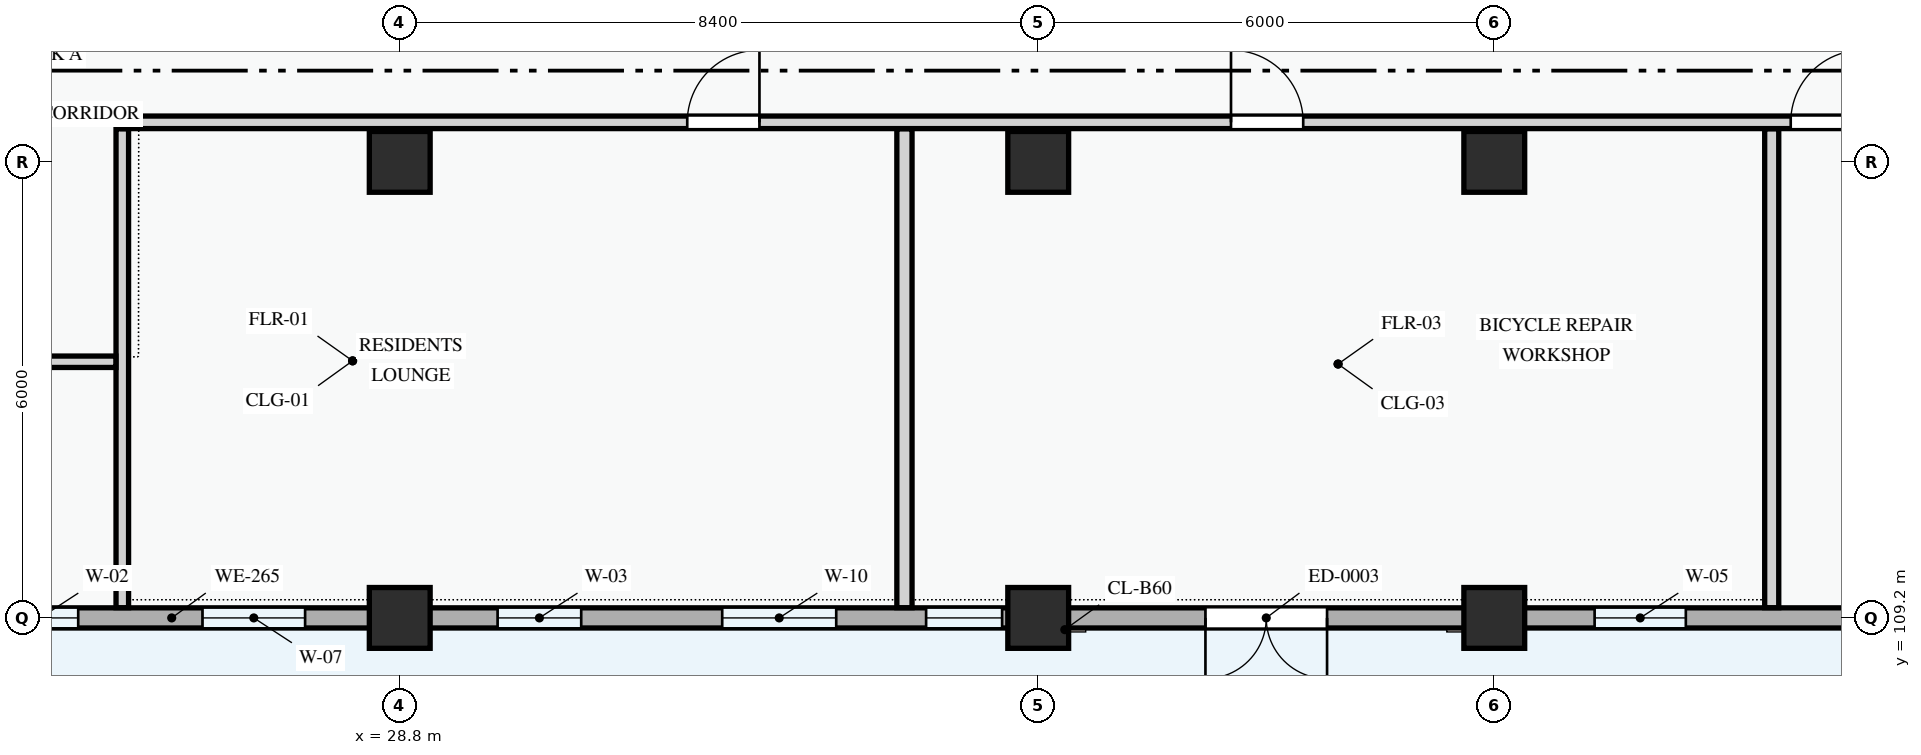
"""IFC4 building model, lengths in metres.
Left out: names, types, materials, properties, quantities, classifications, styles, units other than length and angle.
Written with IfcOpenShell. Run it as: python <this file> out.ifc"""

import sys

from ifc_helpers import new_model, si_unit, direction, frame, frame_2d, origin, origin_2d, place, context, subcontext, project, spatial, rectangle, extrude, element, fill, save


model = new_model("IFC4")
c1 = context("Model", 3, precision=1e-05, world=origin(), true_north=direction((0.0, 1.0)))
c2 = subcontext(c1, "Body", "Model", "MODEL_VIEW")
j1 = project(units=[si_unit("LENGTHUNIT", "METRE"), si_unit("PLANEANGLEUNIT", "RADIAN")], contexts=[c1])
p1 = place(None, origin())
s1 = spatial("IfcSite", under=j1, at=p1, CompositionType="ELEMENT")
p2 = place(p1, origin())
s2 = spatial("IfcBuilding", under=s1, at=p2, CompositionType="ELEMENT")
p3 = place(p2, origin())
s3 = spatial("IfcBuildingStorey", under=s2, at=p3, CompositionType="ELEMENT", Elevation=0.0)
for number, where, z_axis, x_axis in (
    (1, (28.8, 109.2, 0.0), (0.0, 0.0, 1.0), (1.0, 0.0, 0.0)),
    (2, (28.8, 115.2, 0.0), (0.0, 0.0, 1.0), (1.0, 0.0, 0.0)),
    (3, (37.2, 109.2, 0.0), (0.0, 0.0, 1.0), (1.0, 0.0, 0.0)),
    (4, (37.2, 115.2, 0.0), (0.0, 0.0, 1.0), (1.0, 0.0, 0.0)),
    (5, (43.2, 109.2, 0.0), (0.0, 0.0, 1.0), (1.0, 0.0, 0.0)),
    (6, (43.2, 115.2, 0.0), (0.0, 0.0, 1.0), (1.0, 0.0, 0.0)),
):
    element("IfcColumn", number, at=place(p3, frame(where, z_axis=z_axis, x_axis=x_axis)), inside=s3, PredefinedType="COLUMN", context=c2, shape_type="SweptSolid", body=[
        extrude(rectangle(XDim=0.8, YDim=0.8, at=origin_2d()), origin(), (0.0, 0.0, 1.0), 4.5),
    ])
p4 = place(p3, frame((22.8, 109.2, 0.0), z_axis=(0.0, 0.0, 1.0), x_axis=(1.0, 0.0, 0.0)))
e7 = element("IfcWall", 7, at=p4, inside=s3, PredefinedType="STANDARD", context=c2, shape_type="SweptSolid", body=[
    extrude(rectangle(XDim=6.0, YDim=0.265, at=frame_2d((3.0, 0.0))), origin(), (0.0, 0.0, 1.0), 3.585),
])
p5 = place(p4, frame((0.77, 0.0, 0.78)))
e8 = element("IfcOpeningElement", 8, at=p5, cuts=e7, PredefinedType="OPENING", context=c2, shape_type="SweptSolid", body=[
    extrude(rectangle(XDim=1.0, YDim=1.25, at=frame_2d((0.5, 0.625))), frame((0.0, 0.143, 0.0), z_axis=(0.0, -1.0, 0.0), x_axis=(1.0, 0.0, 0.0)), (0.0, 0.0, 1.0), 0.285),
])
p6 = place(p4, frame((3.405, 0.0, 0.78)))
e9 = element("IfcOpeningElement", 9, at=p6, cuts=e7, PredefinedType="OPENING", context=c2, shape_type="SweptSolid", body=[
    extrude(rectangle(XDim=1.35, YDim=1.55, at=frame_2d((0.675, 0.775))), frame((0.0, 0.143, 0.0), z_axis=(0.0, -1.0, 0.0), x_axis=(1.0, 0.0, 0.0)), (0.0, 0.0, 1.0), 0.285),
])
p7 = place(p3, frame((28.8, 109.2, 0.0), z_axis=(0.0, 0.0, 1.0), x_axis=(1.0, 0.0, 0.0)))
e10 = element("IfcWall", 10, at=p7, inside=s3, PredefinedType="STANDARD", context=c2, shape_type="SweptSolid", body=[
    extrude(rectangle(XDim=8.4, YDim=0.265, at=frame_2d((4.2, 0.0))), origin(), (0.0, 0.0, 1.0), 3.485),
])
p8 = place(p7, frame((1.288, 0.0, 0.78)))
e11 = element("IfcOpeningElement", 11, at=p8, cuts=e10, PredefinedType="OPENING", context=c2, shape_type="SweptSolid", body=[
    extrude(rectangle(XDim=1.1, YDim=1.3, at=frame_2d((0.55, 0.65))), frame((0.0, 0.143, 0.0), z_axis=(0.0, -1.0, 0.0), x_axis=(1.0, 0.0, 0.0)), (0.0, 0.0, 1.0), 0.285),
])
p9 = place(p7, frame((4.242, 0.0, 0.78)))
e12 = element("IfcOpeningElement", 12, at=p9, cuts=e10, PredefinedType="OPENING", context=c2, shape_type="SweptSolid", body=[
    extrude(rectangle(XDim=1.5, YDim=1.5, at=frame_2d((0.75, 0.75))), frame((0.0, 0.143, 0.0), z_axis=(0.0, -1.0, 0.0), x_axis=(1.0, 0.0, 0.0)), (0.0, 0.0, 1.0), 0.285),
])
p10 = place(p7, frame((6.925, 0.0, 0.78)))
e13 = element("IfcOpeningElement", 13, at=p10, cuts=e10, PredefinedType="OPENING", context=c2, shape_type="SweptSolid", body=[
    extrude(rectangle(XDim=1.0, YDim=1.25, at=frame_2d((0.5, 0.625))), frame((0.0, 0.143, 0.0), z_axis=(0.0, -1.0, 0.0), x_axis=(1.0, 0.0, 0.0)), (0.0, 0.0, 1.0), 0.285),
])
p11 = place(p3, frame((37.2, 109.2, 0.0), z_axis=(0.0, 0.0, 1.0), x_axis=(1.0, 0.0, 0.0)))
e14 = element("IfcWall", 14, at=p11, inside=s3, PredefinedType="STANDARD", context=c2, shape_type="SweptSolid", body=[
    extrude(rectangle(XDim=6.0, YDim=0.265, at=frame_2d((3.0, 0.0))), origin(), (0.0, 0.0, 1.0), 3.585),
])
p12 = place(p11, frame((2.2, 0.0, 0.0)))
e15 = element("IfcOpeningElement", 15, at=p12, cuts=e14, PredefinedType="OPENING", context=c2, shape_type="SweptSolid", body=[
    extrude(rectangle(XDim=1.6, YDim=2.35, at=frame_2d((0.8, 1.175))), frame((0.0, 0.143, 0.0), z_axis=(0.0, -1.0, 0.0), x_axis=(1.0, 0.0, 0.0)), (0.0, 0.0, 1.0), 0.285),
])
p13 = place(p3, frame((43.2, 109.2, 0.0), z_axis=(0.0, 0.0, 1.0), x_axis=(1.0, 0.0, 0.0)))
e16 = element("IfcWall", 16, at=p13, inside=s3, PredefinedType="STANDARD", context=c2, shape_type="SweptSolid", body=[
    extrude(rectangle(XDim=8.4, YDim=0.265, at=frame_2d((4.2, 0.0))), origin(), (0.0, 0.0, 1.0), 3.485),
])
p14 = place(p13, frame((1.32, 0.0, 0.78)))
e17 = element("IfcOpeningElement", 17, at=p14, cuts=e16, PredefinedType="OPENING", context=c2, shape_type="SweptSolid", body=[
    extrude(rectangle(XDim=1.2, YDim=1.5, at=frame_2d((0.6, 0.75))), frame((0.0, 0.143, 0.0), z_axis=(0.0, -1.0, 0.0), x_axis=(1.0, 0.0, 0.0)), (0.0, 0.0, 1.0), 0.285),
])
p15 = place(p13, frame((5.18, 0.0, 0.78)))
e18 = element("IfcOpeningElement", 18, at=p15, cuts=e16, PredefinedType="OPENING", context=c2, shape_type="SweptSolid", body=[
    extrude(rectangle(XDim=1.5, YDim=1.5, at=frame_2d((0.75, 0.75))), frame((0.0, 0.143, 0.0), z_axis=(0.0, -1.0, 0.0), x_axis=(1.0, 0.0, 0.0)), (0.0, 0.0, 1.0), 0.285),
])
p16 = place(p3, frame((25.15, 109.334, 0.0), z_axis=(0.0, 0.0, 1.0), x_axis=(0.0, 1.0, 0.0)))
e19 = element("IfcWall", 19, at=p16, inside=s3, PredefinedType="PARTITIONING", context=c2, shape_type="SweptSolid", body=[
    extrude(rectangle(XDim=6.301, YDim=0.165, at=frame_2d((3.15, 0.0))), origin(), (0.0, 0.0, 1.0), 4.2),
])
p17 = place(p3, frame((22.66, 112.57, 0.0), z_axis=(0.0, 0.0, 1.0), x_axis=(1.0, 0.0, 0.0)))
e20 = element("IfcWall", 20, at=p17, inside=s3, PredefinedType="PARTITIONING", context=c2, shape_type="SweptSolid", body=[
    extrude(rectangle(XDim=2.406, YDim=0.15, at=frame_2d((1.203, 0.0))), origin(), (0.0, 0.0, 1.0), 4.2),
])
p18 = place(p3, frame((35.44, 109.334, 0.0), z_axis=(0.0, 0.0, 1.0), x_axis=(0.0, 1.0, 0.0)))
e21 = element("IfcWall", 21, at=p18, inside=s3, PredefinedType="PARTITIONING", context=c2, shape_type="SweptSolid", body=[
    extrude(rectangle(XDim=6.301, YDim=0.2, at=frame_2d((3.15, 0.0))), origin(), (0.0, 0.0, 1.0), 4.2),
])
p19 = place(p3, frame((46.85, 109.334, 0.0), z_axis=(0.0, 0.0, 1.0), x_axis=(0.0, 1.0, 0.0)))
e22 = element("IfcWall", 22, at=p19, inside=s3, PredefinedType="PARTITIONING", context=c2, shape_type="SweptSolid", body=[
    extrude(rectangle(XDim=6.301, YDim=0.185, at=frame_2d((3.15, 0.0))), origin(), (0.0, 0.0, 1.0), 4.2),
])
p20 = place(p3, frame((25.15, 115.72, 0.0), z_axis=(0.0, 0.0, 1.0), x_axis=(1.0, 0.0, 0.0)))
e23 = element("IfcWall", 23, at=p20, inside=s3, PredefinedType="PARTITIONING", context=c2, shape_type="SweptSolid", body=[
    extrude(rectangle(XDim=32.316, YDim=0.165, at=frame_2d((16.158, 0.0))), origin(), (0.0, 0.0, 1.0), 4.2),
])
p21 = place(p20, frame((7.433, 0.0, 0.0)))
e24 = element("IfcOpeningElement", 24, at=p21, cuts=e23, PredefinedType="OPENING", context=c2, shape_type="SweptSolid", body=[
    extrude(rectangle(XDim=0.95, YDim=2.1, at=frame_2d((0.475, 1.05))), frame((0.0, 0.093, 0.0), z_axis=(0.0, -1.0, 0.0), x_axis=(1.0, 0.0, 0.0)), (0.0, 0.0, 1.0), 0.185),
])
p22 = place(p20, frame((14.586, 0.0, 0.0)))
e25 = element("IfcOpeningElement", 25, at=p22, cuts=e23, PredefinedType="OPENING", context=c2, shape_type="SweptSolid", body=[
    extrude(rectangle(XDim=0.95, YDim=2.1, at=frame_2d((0.475, 1.05))), frame((0.0, 0.093, 0.0), z_axis=(0.0, -1.0, 0.0), x_axis=(1.0, 0.0, 0.0)), (0.0, 0.0, 1.0), 0.185),
])
p23 = place(p20, frame((21.95, 0.0, 0.0)))
e26 = element("IfcOpeningElement", 26, at=p23, cuts=e23, PredefinedType="OPENING", context=c2, shape_type="SweptSolid", body=[
    extrude(rectangle(XDim=0.95, YDim=2.1, at=frame_2d((0.475, 1.05))), frame((0.0, 0.093, 0.0), z_axis=(0.0, -1.0, 0.0), x_axis=(1.0, 0.0, 0.0)), (0.0, 0.0, 1.0), 0.185),
])
p24 = place(p5, origin())
e27 = element("IfcWindow", 27, at=p24, inside=s3, PartitioningType="SINGLE_PANEL", PredefinedType="WINDOW", context=c2, shape_type="SweptSolid", body=[
    extrude(rectangle(XDim=1.0, YDim=1.25, at=frame_2d((0.5, 0.625))), frame((0.0, 0.03, 0.0), z_axis=(0.0, -1.0, 0.0), x_axis=(1.0, 0.0, 0.0)), (0.0, 0.0, 1.0), 0.06),
])
fill(e8, e27)
p25 = place(p6, origin())
e28 = element("IfcWindow", 28, at=p25, inside=s3, PartitioningType="SINGLE_PANEL", PredefinedType="WINDOW", context=c2, shape_type="SweptSolid", body=[
    extrude(rectangle(XDim=1.35, YDim=1.55, at=frame_2d((0.675, 0.775))), frame((0.0, 0.03, 0.0), z_axis=(0.0, -1.0, 0.0), x_axis=(1.0, 0.0, 0.0)), (0.0, 0.0, 1.0), 0.06),
])
fill(e9, e28)
p26 = place(p8, origin())
e29 = element("IfcWindow", 29, at=p26, inside=s3, PartitioningType="SINGLE_PANEL", PredefinedType="WINDOW", context=c2, shape_type="SweptSolid", body=[
    extrude(rectangle(XDim=1.1, YDim=1.3, at=frame_2d((0.55, 0.65))), frame((0.0, 0.03, 0.0), z_axis=(0.0, -1.0, 0.0), x_axis=(1.0, 0.0, 0.0)), (0.0, 0.0, 1.0), 0.06),
])
fill(e11, e29)
p27 = place(p9, origin())
e30 = element("IfcWindow", 30, at=p27, inside=s3, PartitioningType="SINGLE_PANEL", PredefinedType="WINDOW", context=c2, shape_type="SweptSolid", body=[
    extrude(rectangle(XDim=1.5, YDim=1.5, at=frame_2d((0.75, 0.75))), frame((0.0, 0.03, 0.0), z_axis=(0.0, -1.0, 0.0), x_axis=(1.0, 0.0, 0.0)), (0.0, 0.0, 1.0), 0.06),
])
fill(e12, e30)
p28 = place(p10, origin())
e31 = element("IfcWindow", 31, at=p28, inside=s3, PartitioningType="SINGLE_PANEL", PredefinedType="WINDOW", context=c2, shape_type="SweptSolid", body=[
    extrude(rectangle(XDim=1.0, YDim=1.25, at=frame_2d((0.5, 0.625))), frame((0.0, 0.03, 0.0), z_axis=(0.0, -1.0, 0.0), x_axis=(1.0, 0.0, 0.0)), (0.0, 0.0, 1.0), 0.06),
])
fill(e13, e31)
p29 = place(p12, frame((1.6, 0.0, 0.0), z_axis=(0.0, 0.0, 1.0), x_axis=(-1.0, 0.0, 0.0)))
e32 = element("IfcDoor", 32, at=p29, inside=s3, OperationType="DOUBLE_DOOR_SINGLE_SWING", PredefinedType="DOOR", context=c2, shape_type="SweptSolid", body=[
    extrude(rectangle(XDim=1.6, YDim=2.35, at=frame_2d((0.8, 1.175))), frame((0.0, 0.025, 0.0), z_axis=(0.0, -1.0, 0.0), x_axis=(1.0, 0.0, 0.0)), (0.0, 0.0, 1.0), 0.05),
])
fill(e15, e32)
p30 = place(p14, origin())
e33 = element("IfcWindow", 33, at=p30, inside=s3, PartitioningType="SINGLE_PANEL", PredefinedType="WINDOW", context=c2, shape_type="SweptSolid", body=[
    extrude(rectangle(XDim=1.2, YDim=1.5, at=frame_2d((0.6, 0.75))), frame((0.0, 0.03, 0.0), z_axis=(0.0, -1.0, 0.0), x_axis=(1.0, 0.0, 0.0)), (0.0, 0.0, 1.0), 0.06),
])
fill(e17, e33)
p31 = place(p21, origin())
e34 = element("IfcDoor", 34, at=p31, inside=s3, OperationType="SINGLE_SWING_RIGHT", PredefinedType="DOOR", context=c2, shape_type="SweptSolid", body=[
    extrude(rectangle(XDim=0.95, YDim=2.1, at=frame_2d((0.475, 1.05))), frame((0.0, 0.025, 0.0), z_axis=(0.0, -1.0, 0.0), x_axis=(1.0, 0.0, 0.0)), (0.0, 0.0, 1.0), 0.05),
])
fill(e24, e34)
p32 = place(p22, origin())
e35 = element("IfcDoor", 35, at=p32, inside=s3, OperationType="SINGLE_SWING_LEFT", PredefinedType="DOOR", context=c2, shape_type="SweptSolid", body=[
    extrude(rectangle(XDim=0.95, YDim=2.1, at=frame_2d((0.475, 1.05))), frame((0.0, 0.025, 0.0), z_axis=(0.0, -1.0, 0.0), x_axis=(1.0, 0.0, 0.0)), (0.0, 0.0, 1.0), 0.05),
])
fill(e25, e35)
p33 = place(p23, origin())
e36 = element("IfcDoor", 36, at=p33, inside=s3, OperationType="SINGLE_SWING_RIGHT", PredefinedType="DOOR", context=c2, shape_type="SweptSolid", body=[
    extrude(rectangle(XDim=0.95, YDim=2.1, at=frame_2d((0.475, 1.05))), frame((0.0, 0.025, 0.0), z_axis=(0.0, -1.0, 0.0), x_axis=(1.0, 0.0, 0.0)), (0.0, 0.0, 1.0), 0.05),
])
fill(e26, e36)
save(model, sys.argv[1])
